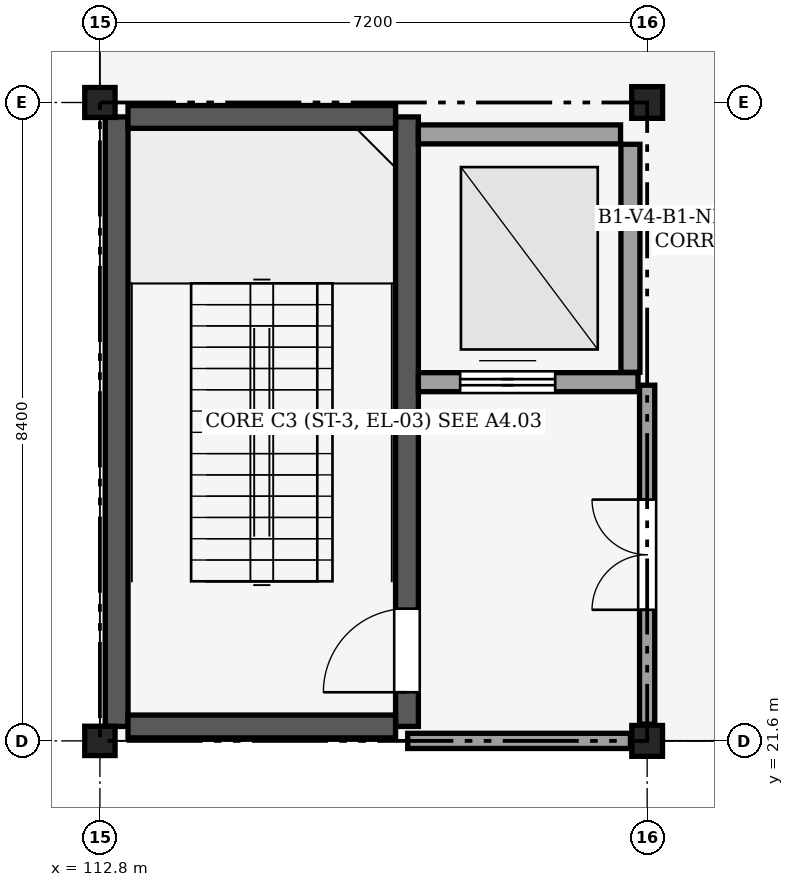
"""IFC4 building model, lengths in metres.
Left out: names, types, materials, properties, quantities, classifications, styles, units other than length and angle.
Written with IfcOpenShell. Run it as: python <this file> out.ifc"""

import sys

from ifc_helpers import new_model, si_unit, direction, frame, frame_2d, origin, origin_2d, place, context, subcontext, project, spatial, rectangle, i_section, extrude, element, fill, save


model = new_model("IFC4")
c1 = context("Model", 3, precision=1e-05, world=origin(), true_north=direction((0.0, 1.0)))
c2 = subcontext(c1, "Body", "Model", "MODEL_VIEW")
j1 = project(units=[si_unit("LENGTHUNIT", "METRE"), si_unit("PLANEANGLEUNIT", "RADIAN")], contexts=[c1])
p1 = place(None, origin())
s1 = spatial("IfcSite", under=j1, at=p1, CompositionType="ELEMENT")
p2 = place(p1, origin())
s2 = spatial("IfcBuilding", under=s1, at=p2, CompositionType="ELEMENT")
p3 = place(p2, frame((0.0, 0.0, -5.4)))
s3 = spatial("IfcBuildingStorey", under=s2, at=p3, CompositionType="ELEMENT", Elevation=-5.4)
p4 = place(p3, frame((112.8, 21.6, 0.0), z_axis=(0.0, 0.0, 1.0), x_axis=(1.0, 0.0, 0.0)))
e1 = element("IfcColumn", 1, at=p4, inside=s3, PredefinedType="COLUMN", context=c2, shape_type="SweptSolid", body=[
    extrude(i_section(OverallWidth=0.399, OverallDepth=0.386, WebThickness=0.021, FlangeThickness=0.033, FilletRadius=0.025, at=origin_2d()), origin(), (0.0, 0.0, 1.0), 5.4),
])
p5 = place(p3, frame((112.8, 30.0, 0.0), z_axis=(0.0, 0.0, 1.0), x_axis=(1.0, 0.0, 0.0)))
e2 = element("IfcColumn", 2, at=p5, inside=s3, PredefinedType="COLUMN", context=c2, shape_type="SweptSolid", body=[
    extrude(i_section(OverallWidth=0.399, OverallDepth=0.394, WebThickness=0.023, FlangeThickness=0.037, FilletRadius=0.025, at=origin_2d()), origin(), (0.0, 0.0, 1.0), 5.4),
])
p6 = place(p3, frame((120.0, 21.6, 0.0), z_axis=(0.0, 0.0, 1.0), x_axis=(1.0, 0.0, 0.0)))
e3 = element("IfcColumn", 3, at=p6, inside=s3, PredefinedType="COLUMN", context=c2, shape_type="SweptSolid", body=[
    extrude(i_section(OverallWidth=0.404, OverallDepth=0.406, WebThickness=0.027, FlangeThickness=0.044, FilletRadius=0.025, at=origin_2d()), origin(), (0.0, 0.0, 1.0), 5.4),
])
p7 = place(p3, frame((120.0, 30.0, 0.0), z_axis=(0.0, 0.0, 1.0), x_axis=(1.0, 0.0, 0.0)))
e4 = element("IfcColumn", 4, at=p7, inside=s3, PredefinedType="COLUMN", context=c2, shape_type="SweptSolid", body=[
    extrude(i_section(OverallWidth=0.406, OverallDepth=0.417, WebThickness=0.03, FlangeThickness=0.048, FilletRadius=0.025, at=origin_2d()), origin(), (0.0, 0.0, 1.0), 5.4),
])
p8 = place(p3, frame((113.02, 21.79, 0.0), z_axis=(0.0, 0.0, 1.0), x_axis=(0.0, 1.0, 0.0)))
e5 = element("IfcWall", 5, at=p8, inside=s3, PredefinedType="SHEAR", context=c2, shape_type="SweptSolid", body=[
    extrude(rectangle(XDim=8.02, YDim=0.3, at=frame_2d((4.01, 0.0))), origin(), (0.0, 0.0, 1.0), 5.12),
])
p9 = place(p3, frame((116.84, 21.79, 0.0), z_axis=(0.0, 0.0, 1.0), x_axis=(0.0, 1.0, 0.0)))
e6 = element("IfcWall", 6, at=p9, inside=s3, PredefinedType="SHEAR", context=c2, shape_type="SweptSolid", body=[
    extrude(rectangle(XDim=8.02, YDim=0.3, at=frame_2d((4.01, 0.0))), origin(), (0.0, 0.0, 1.0), 5.12),
])
p10 = place(p9, frame((0.45, 0.0, 0.0)))
e7 = element("IfcOpeningElement", 7, at=p10, cuts=e6, PredefinedType="OPENING", context=c2, shape_type="SweptSolid", body=[
    extrude(rectangle(XDim=1.1, YDim=2.15, at=frame_2d((0.55, 1.075))), frame((0.0, 0.16, 0.0), z_axis=(0.0, -1.0, 0.0), x_axis=(1.0, 0.0, 0.0)), (0.0, 0.0, 1.0), 0.321),
])
for number, where, z_axis, x_axis in (
    (8, (113.17, 21.79, 0.0), (0.0, 0.0, 1.0), (1.0, 0.0, 0.0)),
    (9, (113.17, 29.81, 0.0), (0.0, 0.0, 1.0), (1.0, 0.0, 0.0)),
):
    element("IfcWall", number, at=place(p3, frame(where, z_axis=z_axis, x_axis=x_axis)), inside=s3, PredefinedType="SHEAR", context=c2, shape_type="SweptSolid", body=[
        extrude(rectangle(XDim=3.52, YDim=0.3, at=frame_2d((1.76, 0.0))), origin(), (0.0, 0.0, 1.0), 5.12),
    ])
p11 = place(p3, frame((116.99, 29.58, 0.0), z_axis=(0.0, 0.0, 1.0), x_axis=(1.0, 0.0, 0.0)))
e10 = element("IfcWall", 10, at=p11, inside=s3, PredefinedType="PARTITIONING", context=c2, shape_type="SweptSolid", body=[
    extrude(rectangle(XDim=2.66, YDim=0.25, at=frame_2d((1.33, 0.0))), origin(), (0.0, 0.0, 1.0), 5.12),
])
p12 = place(p3, frame((119.78, 26.45, 0.0), z_axis=(0.0, 0.0, 1.0), x_axis=(0.0, 1.0, 0.0)))
e11 = element("IfcWall", 11, at=p12, inside=s3, PredefinedType="PARTITIONING", context=c2, shape_type="SweptSolid", body=[
    extrude(rectangle(XDim=3.0, YDim=0.25, at=frame_2d((1.5, 0.0))), origin(), (0.0, 0.0, 1.0), 4.407),
])
p13 = place(p3, frame((116.99, 26.32, 0.0), z_axis=(0.0, 0.0, 1.0), x_axis=(1.0, 0.0, 0.0)))
e12 = element("IfcWall", 12, at=p13, inside=s3, PredefinedType="PARTITIONING", context=c2, shape_type="SweptSolid", body=[
    extrude(rectangle(XDim=2.89, YDim=0.25, at=frame_2d((1.445, 0.0))), origin(), (0.0, 0.0, 1.0), 5.12),
])
p14 = place(p13, frame((0.55, 0.0, 0.0)))
e13 = element("IfcOpeningElement", 13, at=p14, cuts=e12, PredefinedType="OPENING", context=c2, shape_type="SweptSolid", body=[
    extrude(rectangle(XDim=1.25, YDim=2.15, at=frame_2d((0.625, 1.075))), frame((0.0, 0.135, 0.0), z_axis=(0.0, -1.0, 0.0), x_axis=(1.0, 0.0, 0.0)), (0.0, 0.0, 1.0), 0.271),
])
p15 = place(p3, frame((116.85, 21.6, 0.0), z_axis=(0.0, 0.0, 1.0), x_axis=(1.0, 0.0, 0.0)))
e14 = element("IfcWall", 14, at=p15, inside=s3, PredefinedType="PARTITIONING", context=c2, shape_type="SweptSolid", body=[
    extrude(rectangle(XDim=2.93, YDim=0.2, at=frame_2d((1.465, 0.0))), origin(), (0.0, 0.0, 1.0), 4.567),
])
p16 = place(p3, frame((120.0, 21.82, 0.0), z_axis=(0.0, 0.0, 1.0), x_axis=(0.0, 1.0, 0.0)))
e15 = element("IfcWall", 15, at=p16, inside=s3, PredefinedType="PARTITIONING", context=c2, shape_type="SweptSolid", body=[
    extrude(rectangle(XDim=4.46, YDim=0.2, at=frame_2d((2.23, 0.0))), origin(), (0.0, 0.0, 1.0), 4.407),
])
p17 = place(p16, frame((1.505, 0.0, 0.0)))
e16 = element("IfcOpeningElement", 16, at=p17, cuts=e15, PredefinedType="OPENING", context=c2, shape_type="SweptSolid", body=[
    extrude(rectangle(XDim=1.45, YDim=2.2, at=frame_2d((0.725, 1.1))), frame((0.0, 0.11, 0.0), z_axis=(0.0, -1.0, 0.0), x_axis=(1.0, 0.0, 0.0)), (0.0, 0.0, 1.0), 0.22),
])
p18 = place(p10, origin())
e17 = element("IfcDoor", 17, at=p18, inside=s3, OperationType="SINGLE_SWING_LEFT", PredefinedType="DOOR", context=c2, shape_type="SweptSolid", body=[
    extrude(rectangle(XDim=1.1, YDim=2.15, at=frame_2d((0.55, 1.075))), frame((0.0, 0.025, 0.0), z_axis=(0.0, -1.0, 0.0), x_axis=(1.0, 0.0, 0.0)), (0.0, 0.0, 1.0), 0.05),
])
fill(e7, e17)
p19 = place(p14, origin())
e18 = element("IfcDoor", 18, at=p19, inside=s3, OperationType="DOUBLE_DOOR_SLIDING", PredefinedType="DOOR", context=c2, shape_type="SweptSolid", body=[
    extrude(rectangle(XDim=1.25, YDim=2.15, at=frame_2d((0.625, 1.075))), frame((0.0, 0.025, 0.0), z_axis=(0.0, -1.0, 0.0), x_axis=(1.0, 0.0, 0.0)), (0.0, 0.0, 1.0), 0.05),
])
fill(e13, e18)
p20 = place(p17, origin())
e19 = element("IfcDoor", 19, at=p20, inside=s3, OperationType="DOUBLE_DOOR_SINGLE_SWING", PredefinedType="DOOR", context=c2, shape_type="SweptSolid", body=[
    extrude(rectangle(XDim=1.45, YDim=2.2, at=frame_2d((0.725, 1.1))), frame((0.0, 0.025, 0.0), z_axis=(0.0, -1.0, 0.0), x_axis=(1.0, 0.0, 0.0)), (0.0, 0.0, 1.0), 0.05),
])
fill(e16, e19)
save(model, sys.argv[1])
